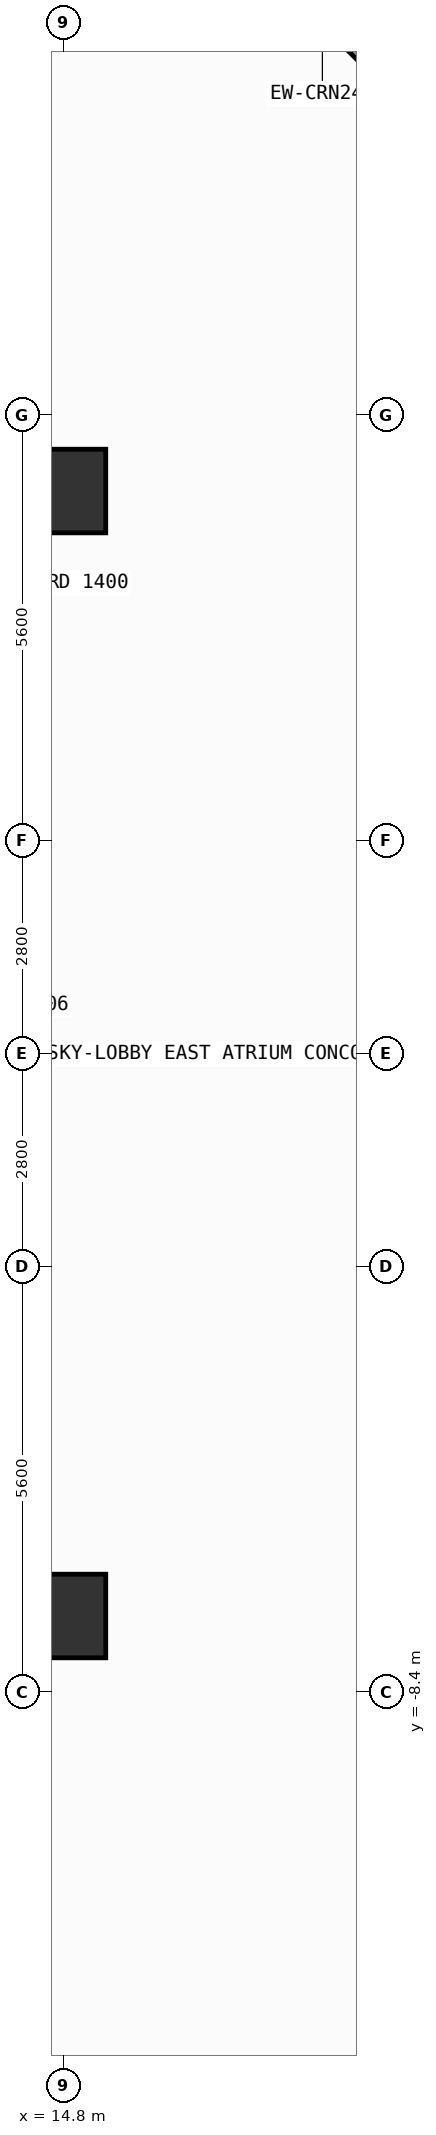
"""IFC4 building model, lengths in metres.
Left out: names, types, materials, properties, quantities, classifications, styles, units other than length and angle.
Written with IfcOpenShell. Run it as: python <this file> out.ifc"""

import sys

from ifc_helpers import new_model, si_unit, direction, frame, frame_2d, origin, origin_2d, place, context, subcontext, project, spatial, rectangle, extrude, element, save


model = new_model("IFC4")
c1 = context("Model", 3, precision=1e-05, world=origin(), true_north=direction((0.0, 1.0)))
c2 = subcontext(c1, "Body", "Model", "MODEL_VIEW")
j1 = project(units=[si_unit("LENGTHUNIT", "METRE"), si_unit("PLANEANGLEUNIT", "RADIAN")], contexts=[c1])
p1 = place(None, origin())
s1 = spatial("IfcSite", under=j1, at=p1, CompositionType="ELEMENT")
p2 = place(p1, origin())
s2 = spatial("IfcBuilding", under=s1, at=p2, CompositionType="ELEMENT")
p3 = place(p2, frame((0.0, 0.0, 210.9)))
s3 = spatial("IfcBuildingStorey", under=s2, at=p3, CompositionType="ELEMENT", Elevation=210.9)
for number, where, z_axis, x_axis in (
    (1, (14.8, -7.4, 0.0), (0.0, 0.0, 1.0), (1.0, 0.0, 0.0)),
    (2, (14.8, 7.4, 0.0), (0.0, 0.0, 1.0), (1.0, 0.0, 0.0)),
):
    element("IfcColumn", number, at=place(p3, frame(where, z_axis=z_axis, x_axis=x_axis)), inside=s3, PredefinedType="COLUMN", context=c2, shape_type="SweptSolid", body=[
        extrude(rectangle(XDim=1.1, YDim=1.1, at=origin_2d()), origin(), (0.0, 0.0, 1.0), 4.8),
    ])
p4 = place(p3, frame((16.008, 15.892, 0.0), z_axis=(0.0, 0.0, 1.0), x_axis=(0.707106781187, -0.707106781187, 0.0)))
e3 = element("IfcWall", 3, at=p4, inside=s3, PredefinedType="SOLIDWALL", context=c2, shape_type="SweptSolid", body=[
    extrude(rectangle(XDim=6.201, YDim=0.24, at=frame_2d((3.101, 0.0))), origin(), (0.0, 0.0, 1.0), 4.58),
])
save(model, sys.argv[1])
